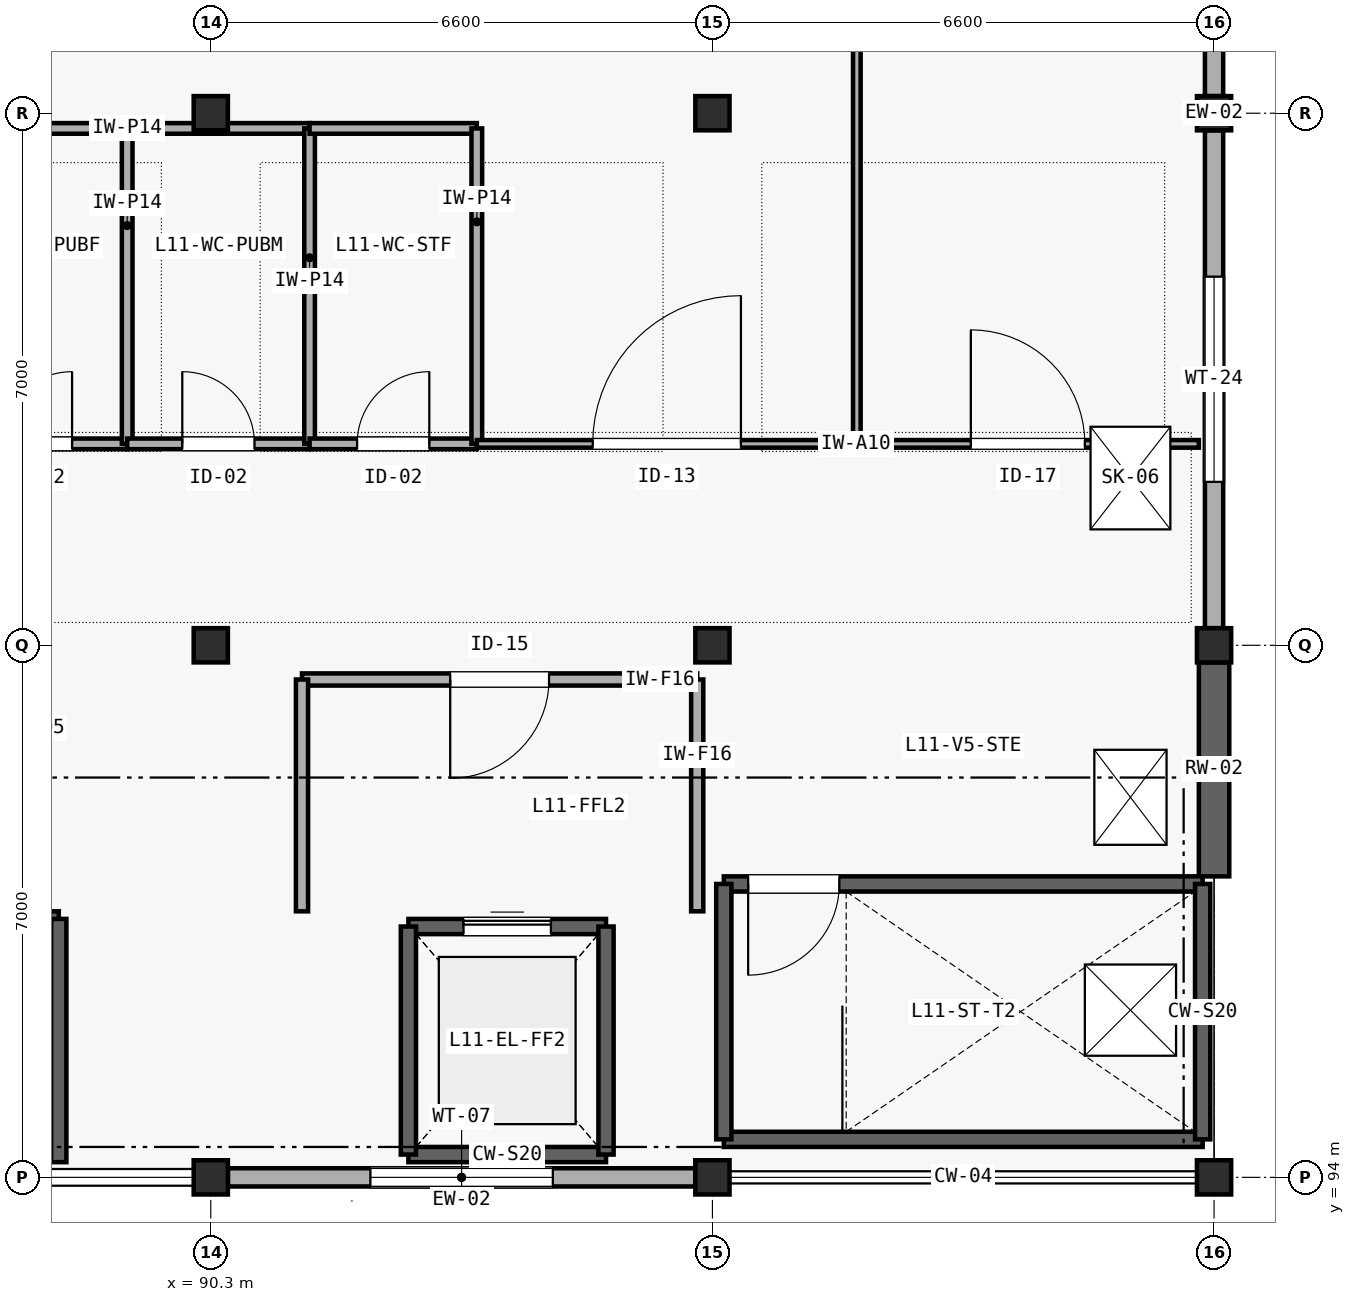
"""IFC4 building model, lengths in metres.
Left out: names, types, materials, properties, quantities, classifications, styles, units other than length and angle.
Written with IfcOpenShell. Run it as: python <this file> out.ifc"""

import sys

from ifc_helpers import new_model, si_unit, direction, frame, frame_2d, origin, origin_2d, place, context, subcontext, project, spatial, rectangle, extrude, element, fill, save


model = new_model("IFC4")
c1 = context("Model", 3, precision=1e-05, world=origin(), true_north=direction((0.0, 1.0)))
c2 = subcontext(c1, "Body", "Model", "MODEL_VIEW")
j1 = project(units=[si_unit("LENGTHUNIT", "METRE"), si_unit("PLANEANGLEUNIT", "RADIAN")], contexts=[c1])
p1 = place(None, origin())
s1 = spatial("IfcSite", under=j1, at=p1, CompositionType="ELEMENT")
p2 = place(p1, origin())
s2 = spatial("IfcBuilding", under=s1, at=p2, CompositionType="ELEMENT")
p3 = place(p2, frame((0.0, 0.0, 46.2)))
s3 = spatial("IfcBuildingStorey", under=s2, at=p3, CompositionType="ELEMENT", Elevation=46.2)
for number, where, z_axis, x_axis in (
    (1, (90.3, 94.0, 0.0), (0.0, 0.0, 1.0), (1.0, 0.0, 0.0)),
    (2, (90.3, 101.0, 0.0), (0.0, 0.0, 1.0), (1.0, 0.0, 0.0)),
    (3, (90.3, 108.0, 0.0), (0.0, 0.0, 1.0), (1.0, 0.0, 0.0)),
    (4, (96.9, 94.0, 0.0), (0.0, 0.0, 1.0), (1.0, 0.0, 0.0)),
    (5, (96.9, 101.0, 0.0), (0.0, 0.0, 1.0), (1.0, 0.0, 0.0)),
    (6, (96.9, 108.0, 0.0), (0.0, 0.0, 1.0), (1.0, 0.0, 0.0)),
    (7, (103.5, 94.0, 0.0), (0.0, 0.0, 1.0), (1.0, 0.0, 0.0)),
    (8, (103.5, 101.0, 0.0), (0.0, 0.0, 1.0), (1.0, 0.0, 0.0)),
    (9, (103.5, 108.0, 0.0), (0.0, 0.0, 1.0), (1.0, 0.0, 0.0)),
):
    element("IfcColumn", number, at=place(p3, frame(where, z_axis=z_axis, x_axis=x_axis)), inside=s3, PredefinedType="COLUMN", context=c2, shape_type="SweptSolid", body=[
        extrude(rectangle(XDim=0.45, YDim=0.45, at=origin_2d()), origin(), (0.0, 0.0, 1.0), 4.2),
    ])
p4 = place(p3, frame((90.525, 94.0, 0.0), z_axis=(0.0, 0.0, 1.0), x_axis=(1.0, 0.0, 0.0)))
e10 = element("IfcWall", 10, at=p4, inside=s3, PredefinedType="SOLIDWALL", context=c2, shape_type="SweptSolid", body=[
    extrude(rectangle(XDim=6.15, YDim=0.24, at=frame_2d((3.075, 0.0))), origin(), (0.0, 0.0, 1.0), 3.135),
])
p5 = place(p4, frame((1.875, 0.0, 0.85)))
e11 = element("IfcOpeningElement", 11, at=p5, cuts=e10, PredefinedType="OPENING", context=c2, shape_type="SweptSolid", body=[
    extrude(rectangle(XDim=2.4, YDim=1.35, at=frame_2d((1.2, 0.675))), frame((0.0, 0.13, 0.0), z_axis=(0.0, -1.0, 0.0), x_axis=(1.0, 0.0, 0.0)), (0.0, 0.0, 1.0), 0.26),
])
p6 = place(p3, frame((103.5, 97.96, 0.0), z_axis=(0.0, 0.0, 1.0), x_axis=(0.0, 1.0, 0.0)))
e12 = element("IfcWall", 12, at=p6, inside=s3, PredefinedType="SHEAR", context=c2, shape_type="SweptSolid", body=[
    extrude(rectangle(XDim=2.815, YDim=0.4, at=frame_2d((1.407, 0.0))), origin(), (0.0, 0.0, 1.0), 3.85),
])
p7 = place(p3, frame((103.5, 101.225, 0.0), z_axis=(0.0, 0.0, 1.0), x_axis=(0.0, 1.0, 0.0)))
e13 = element("IfcWall", 13, at=p7, inside=s3, PredefinedType="SOLIDWALL", context=c2, shape_type="SweptSolid", body=[
    extrude(rectangle(XDim=6.55, YDim=0.24, at=frame_2d((3.275, 0.0))), origin(), (0.0, 0.0, 1.0), 3.247),
])
p8 = place(p7, frame((1.925, 0.0, 0.85)))
e14 = element("IfcOpeningElement", 14, at=p8, cuts=e13, PredefinedType="OPENING", context=c2, shape_type="SweptSolid", body=[
    extrude(rectangle(XDim=2.7, YDim=1.6, at=frame_2d((1.35, 0.8))), frame((0.0, 0.13, 0.0), z_axis=(0.0, -1.0, 0.0), x_axis=(1.0, 0.0, 0.0)), (0.0, 0.0, 1.0), 0.26),
])
p9 = place(p3, frame((103.5, 108.225, 0.0), z_axis=(0.0, 0.0, 1.0), x_axis=(0.0, 1.0, 0.0)))
e15 = element("IfcWall", 15, at=p9, inside=s3, PredefinedType="SOLIDWALL", context=c2, shape_type="SweptSolid", body=[
    extrude(rectangle(XDim=6.55, YDim=0.24, at=frame_2d((3.275, 0.0))), origin(), (0.0, 0.0, 1.0), 3.313),
])
p10 = place(p9, frame((1.625, 0.0, 0.85)))
e16 = element("IfcOpeningElement", 16, at=p10, cuts=e15, PredefinedType="OPENING", context=c2, shape_type="SweptSolid", body=[
    extrude(rectangle(XDim=3.3, YDim=1.6, at=frame_2d((1.65, 0.8))), frame((0.0, 0.13, 0.0), z_axis=(0.0, -1.0, 0.0), x_axis=(1.0, 0.0, 0.0)), (0.0, 0.0, 1.0), 0.26),
])
p11 = place(p3, frame((97.05, 94.5, 0.0), z_axis=(0.0, 0.0, 1.0), x_axis=(1.0, 0.0, 0.0)))
e17 = element("IfcWall", 17, at=p11, inside=s3, PredefinedType="SHEAR", context=c2, shape_type="SweptSolid", body=[
    extrude(rectangle(XDim=6.3, YDim=0.2, at=frame_2d((3.15, 0.0))), origin(), (0.0, 0.0, 1.0), 4.2),
])
p12 = place(p3, frame((97.05, 97.86, 0.0), z_axis=(0.0, 0.0, 1.0), x_axis=(1.0, 0.0, 0.0)))
e18 = element("IfcWall", 18, at=p12, inside=s3, PredefinedType="SHEAR", context=c2, shape_type="SweptSolid", body=[
    extrude(rectangle(XDim=6.3, YDim=0.2, at=frame_2d((3.15, 0.0))), origin(), (0.0, 0.0, 1.0), 4.2),
])
p13 = place(p12, frame((0.32, 0.0, 0.0)))
e19 = element("IfcOpeningElement", 19, at=p13, cuts=e18, PredefinedType="OPENING", context=c2, shape_type="SweptSolid", body=[
    extrude(rectangle(XDim=1.2, YDim=2.15, at=frame_2d((0.6, 1.075))), frame((0.0, 0.11, 0.0), z_axis=(0.0, -1.0, 0.0), x_axis=(1.0, 0.0, 0.0)), (0.0, 0.0, 1.0), 0.22),
])
for number, where, z_axis, x_axis in (
    (20, (97.05, 94.5, 0.0), (0.0, 0.0, 1.0), (0.0, 1.0, 0.0)),
    (21, (103.35, 94.5, 0.0), (0.0, 0.0, 1.0), (0.0, 1.0, 0.0)),
):
    element("IfcWall", number, at=place(p3, frame(where, z_axis=z_axis, x_axis=x_axis)), inside=s3, PredefinedType="SHEAR", context=c2, shape_type="SweptSolid", body=[
        extrude(rectangle(XDim=3.36, YDim=0.2, at=frame_2d((1.68, 0.0))), origin(), (0.0, 0.0, 1.0), 4.2),
    ])
p14 = place(p3, frame((92.9, 94.3, 0.0), z_axis=(0.0, 0.0, 1.0), x_axis=(1.0, 0.0, 0.0)))
e22 = element("IfcWall", 22, at=p14, inside=s3, PredefinedType="SHEAR", context=c2, shape_type="SweptSolid", body=[
    extrude(rectangle(XDim=2.6, YDim=0.2, at=frame_2d((1.3, 0.0))), origin(), (0.0, 0.0, 1.0), 4.2),
])
p15 = place(p3, frame((92.9, 97.3, 0.0), z_axis=(0.0, 0.0, 1.0), x_axis=(1.0, 0.0, 0.0)))
e23 = element("IfcWall", 23, at=p15, inside=s3, PredefinedType="SHEAR", context=c2, shape_type="SweptSolid", body=[
    extrude(rectangle(XDim=2.6, YDim=0.2, at=frame_2d((1.3, 0.0))), origin(), (0.0, 0.0, 1.0), 4.2),
])
p16 = place(p15, frame((0.725, 0.0, 0.0)))
e24 = element("IfcOpeningElement", 24, at=p16, cuts=e23, PredefinedType="OPENING", context=c2, shape_type="SweptSolid", body=[
    extrude(rectangle(XDim=1.15, YDim=2.2, at=frame_2d((0.575, 1.1))), frame((0.0, 0.11, 0.0), z_axis=(0.0, -1.0, 0.0), x_axis=(1.0, 0.0, 0.0)), (0.0, 0.0, 1.0), 0.22),
])
for number, where, z_axis, x_axis in (
    (25, (92.9, 94.3, 0.0), (0.0, 0.0, 1.0), (0.0, 1.0, 0.0)),
    (26, (95.5, 94.3, 0.0), (0.0, 0.0, 1.0), (0.0, 1.0, 0.0)),
):
    element("IfcWall", number, at=place(p3, frame(where, z_axis=z_axis, x_axis=x_axis)), inside=s3, PredefinedType="SHEAR", context=c2, shape_type="SweptSolid", body=[
        extrude(rectangle(XDim=3.0, YDim=0.2, at=frame_2d((1.5, 0.0))), origin(), (0.0, 0.0, 1.0), 4.2),
    ])
p17 = place(p3, frame((85.7, 97.4, 0.0), z_axis=(0.0, 0.0, 1.0), x_axis=(1.0, 0.0, 0.0)))
e27 = element("IfcWall", 27, at=p17, inside=s3, PredefinedType="SHEAR", context=c2, shape_type="SweptSolid", body=[
    extrude(rectangle(XDim=2.6, YDim=0.2, at=frame_2d((1.3, 0.0))), origin(), (0.0, 0.0, 1.0), 4.2),
])
p18 = place(p17, frame((0.7, 0.0, 0.0)))
e28 = element("IfcOpeningElement", 28, at=p18, cuts=e27, PredefinedType="OPENING", context=c2, shape_type="SweptSolid", body=[
    extrude(rectangle(XDim=1.2, YDim=2.2, at=frame_2d((0.6, 1.1))), frame((0.0, 0.11, 0.0), z_axis=(0.0, -1.0, 0.0), x_axis=(1.0, 0.0, 0.0)), (0.0, 0.0, 1.0), 0.22),
])
p19 = place(p3, frame((88.3, 94.2, 0.0), z_axis=(0.0, 0.0, 1.0), x_axis=(0.0, 1.0, 0.0)))
e29 = element("IfcWall", 29, at=p19, inside=s3, PredefinedType="SHEAR", context=c2, shape_type="SweptSolid", body=[
    extrude(rectangle(XDim=3.2, YDim=0.2, at=frame_2d((1.6, 0.0))), origin(), (0.0, 0.0, 1.0), 4.2),
])
p20 = place(p3, frame((91.5, 100.55, 0.0), z_axis=(0.0, 0.0, 1.0), x_axis=(1.0, 0.0, 0.0)))
e30 = element("IfcWall", 30, at=p20, inside=s3, PredefinedType="SOLIDWALL", context=c2, shape_type="SweptSolid", body=[
    extrude(rectangle(XDim=5.2, YDim=0.16, at=frame_2d((2.6, 0.0))), origin(), (0.0, 0.0, 1.0), 3.9),
])
p21 = place(p20, frame((1.95, 0.0, 0.0)))
e31 = element("IfcOpeningElement", 31, at=p21, cuts=e30, PredefinedType="OPENING", context=c2, shape_type="SweptSolid", body=[
    extrude(rectangle(XDim=1.3, YDim=2.15, at=frame_2d((0.65, 1.075))), frame((0.0, 0.09, 0.0), z_axis=(0.0, -1.0, 0.0), x_axis=(1.0, 0.0, 0.0)), (0.0, 0.0, 1.0), 0.18),
])
p22 = place(p3, frame((91.5, 97.5, 0.0), z_axis=(0.0, 0.0, 1.0), x_axis=(0.0, 1.0, 0.0)))
e32 = element("IfcWall", 32, at=p22, inside=s3, PredefinedType="SOLIDWALL", context=c2, shape_type="SweptSolid", body=[
    extrude(rectangle(XDim=3.05, YDim=0.16, at=frame_2d((1.525, 0.0))), origin(), (0.0, 0.0, 1.0), 3.9),
])
p23 = place(p3, frame((96.7, 97.5, 0.0), z_axis=(0.0, 0.0, 1.0), x_axis=(0.0, 1.0, 0.0)))
e33 = element("IfcWall", 33, at=p23, inside=s3, PredefinedType="SOLIDWALL", context=c2, shape_type="SweptSolid", body=[
    extrude(rectangle(XDim=3.05, YDim=0.16, at=frame_2d((1.525, 0.0))), origin(), (0.0, 0.0, 1.0), 3.405),
])
p24 = place(p3, frame((86.8, 103.65, 0.0), z_axis=(0.0, 0.0, 1.0), x_axis=(1.0, 0.0, 0.0)))
e34 = element("IfcWall", 34, at=p24, inside=s3, PredefinedType="PLUMBINGWALL", context=c2, shape_type="SweptSolid", body=[
    extrude(rectangle(XDim=2.4, YDim=0.14, at=frame_2d((1.2, 0.0))), origin(), (0.0, 0.0, 1.0), 3.9),
])
p25 = place(p24, frame((0.725, 0.0, 0.0)))
e35 = element("IfcOpeningElement", 35, at=p25, cuts=e34, PredefinedType="OPENING", context=c2, shape_type="SweptSolid", body=[
    extrude(rectangle(XDim=0.95, YDim=2.1, at=frame_2d((0.475, 1.05))), frame((0.0, 0.08, 0.0), z_axis=(0.0, -1.0, 0.0), x_axis=(1.0, 0.0, 0.0)), (0.0, 0.0, 1.0), 0.16),
])
p26 = place(p3, frame((86.8, 107.8, 0.0), z_axis=(0.0, 0.0, 1.0), x_axis=(1.0, 0.0, 0.0)))
e36 = element("IfcWall", 36, at=p26, inside=s3, PredefinedType="PLUMBINGWALL", context=c2, shape_type="SweptSolid", body=[
    extrude(rectangle(XDim=2.4, YDim=0.14, at=frame_2d((1.2, 0.0))), origin(), (0.0, 0.0, 1.0), 3.135),
])
p27 = place(p3, frame((89.2, 103.65, 0.0), z_axis=(0.0, 0.0, 1.0), x_axis=(0.0, 1.0, 0.0)))
e37 = element("IfcWall", 37, at=p27, inside=s3, PredefinedType="PLUMBINGWALL", context=c2, shape_type="SweptSolid", body=[
    extrude(rectangle(XDim=4.15, YDim=0.14, at=frame_2d((2.075, 0.0))), origin(), (0.0, 0.0, 1.0), 3.9),
])
p28 = place(p3, frame((89.2, 103.65, 0.0), z_axis=(0.0, 0.0, 1.0), x_axis=(1.0, 0.0, 0.0)))
e38 = element("IfcWall", 38, at=p28, inside=s3, PredefinedType="PLUMBINGWALL", context=c2, shape_type="SweptSolid", body=[
    extrude(rectangle(XDim=2.4, YDim=0.14, at=frame_2d((1.2, 0.0))), origin(), (0.0, 0.0, 1.0), 3.9),
])
p29 = place(p28, frame((0.725, 0.0, 0.0)))
e39 = element("IfcOpeningElement", 39, at=p29, cuts=e38, PredefinedType="OPENING", context=c2, shape_type="SweptSolid", body=[
    extrude(rectangle(XDim=0.95, YDim=2.1, at=frame_2d((0.475, 1.05))), frame((0.0, 0.08, 0.0), z_axis=(0.0, -1.0, 0.0), x_axis=(1.0, 0.0, 0.0)), (0.0, 0.0, 1.0), 0.16),
])
p30 = place(p3, frame((89.2, 107.8, 0.0), z_axis=(0.0, 0.0, 1.0), x_axis=(1.0, 0.0, 0.0)))
e40 = element("IfcWall", 40, at=p30, inside=s3, PredefinedType="PLUMBINGWALL", context=c2, shape_type="SweptSolid", body=[
    extrude(rectangle(XDim=2.4, YDim=0.14, at=frame_2d((1.2, 0.0))), origin(), (0.0, 0.0, 1.0), 3.135),
])
p31 = place(p3, frame((91.6, 103.65, 0.0), z_axis=(0.0, 0.0, 1.0), x_axis=(0.0, 1.0, 0.0)))
e41 = element("IfcWall", 41, at=p31, inside=s3, PredefinedType="PLUMBINGWALL", context=c2, shape_type="SweptSolid", body=[
    extrude(rectangle(XDim=4.15, YDim=0.14, at=frame_2d((2.075, 0.0))), origin(), (0.0, 0.0, 1.0), 3.9),
])
p32 = place(p3, frame((91.6, 103.65, 0.0), z_axis=(0.0, 0.0, 1.0), x_axis=(1.0, 0.0, 0.0)))
e42 = element("IfcWall", 42, at=p32, inside=s3, PredefinedType="PLUMBINGWALL", context=c2, shape_type="SweptSolid", body=[
    extrude(rectangle(XDim=2.2, YDim=0.14, at=frame_2d((1.1, 0.0))), origin(), (0.0, 0.0, 1.0), 3.9),
])
p33 = place(p32, frame((0.625, 0.0, 0.0)))
e43 = element("IfcOpeningElement", 43, at=p33, cuts=e42, PredefinedType="OPENING", context=c2, shape_type="SweptSolid", body=[
    extrude(rectangle(XDim=0.95, YDim=2.1, at=frame_2d((0.475, 1.05))), frame((0.0, 0.08, 0.0), z_axis=(0.0, -1.0, 0.0), x_axis=(1.0, 0.0, 0.0)), (0.0, 0.0, 1.0), 0.16),
])
p34 = place(p3, frame((91.6, 107.8, 0.0), z_axis=(0.0, 0.0, 1.0), x_axis=(1.0, 0.0, 0.0)))
e44 = element("IfcWall", 44, at=p34, inside=s3, PredefinedType="PLUMBINGWALL", context=c2, shape_type="SweptSolid", body=[
    extrude(rectangle(XDim=2.2, YDim=0.14, at=frame_2d((1.1, 0.0))), origin(), (0.0, 0.0, 1.0), 3.135),
])
p35 = place(p3, frame((93.8, 103.65, 0.0), z_axis=(0.0, 0.0, 1.0), x_axis=(0.0, 1.0, 0.0)))
e45 = element("IfcWall", 45, at=p35, inside=s3, PredefinedType="PLUMBINGWALL", context=c2, shape_type="SweptSolid", body=[
    extrude(rectangle(XDim=4.15, YDim=0.14, at=frame_2d((2.075, 0.0))), origin(), (0.0, 0.0, 1.0), 3.9),
])
p36 = place(p3, frame((93.8, 103.65, 0.0), z_axis=(0.0, 0.0, 1.0), x_axis=(1.0, 0.0, 0.0)))
e46 = element("IfcWall", 46, at=p36, inside=s3, PredefinedType="PARTITIONING", context=c2, shape_type="SweptSolid", body=[
    extrude(rectangle(XDim=5.0, YDim=0.1, at=frame_2d((2.5, 0.0))), origin(), (0.0, 0.0, 1.0), 3.9),
])
p37 = place(p36, frame((1.525, 0.0, 0.0)))
e47 = element("IfcOpeningElement", 47, at=p37, cuts=e46, PredefinedType="OPENING", context=c2, shape_type="SweptSolid", body=[
    extrude(rectangle(XDim=1.95, YDim=2.3, at=frame_2d((0.975, 1.15))), frame((0.0, 0.06, 0.0), z_axis=(0.0, -1.0, 0.0), x_axis=(1.0, 0.0, 0.0)), (0.0, 0.0, 1.0), 0.12),
])
p38 = place(p3, frame((98.8, 103.65, 0.0), z_axis=(0.0, 0.0, 1.0), x_axis=(0.0, 1.0, 0.0)))
e48 = element("IfcWall", 48, at=p38, inside=s3, PredefinedType="PARTITIONING", context=c2, shape_type="SweptSolid", body=[
    extrude(rectangle(XDim=11.15, YDim=0.1, at=frame_2d((5.575, 0.0))), origin(), (0.0, 0.0, 1.0), 3.9),
])
p39 = place(p3, frame((98.8, 103.65, 0.0), z_axis=(0.0, 0.0, 1.0), x_axis=(1.0, 0.0, 0.0)))
e49 = element("IfcWall", 49, at=p39, inside=s3, PredefinedType="PARTITIONING", context=c2, shape_type="SweptSolid", body=[
    extrude(rectangle(XDim=4.5, YDim=0.1, at=frame_2d((2.25, 0.0))), origin(), (0.0, 0.0, 1.0), 3.9),
])
p40 = place(p39, frame((1.5, 0.0, 0.0)))
e50 = element("IfcOpeningElement", 50, at=p40, cuts=e49, PredefinedType="OPENING", context=c2, shape_type="SweptSolid", body=[
    extrude(rectangle(XDim=1.5, YDim=2.15, at=frame_2d((0.75, 1.075))), frame((0.0, 0.06, 0.0), z_axis=(0.0, -1.0, 0.0), x_axis=(1.0, 0.0, 0.0)), (0.0, 0.0, 1.0), 0.12),
])
p41 = place(p5, origin())
e51 = element("IfcWindow", 51, at=p41, inside=s3, PartitioningType="SINGLE_PANEL", PredefinedType="WINDOW", context=c2, shape_type="SweptSolid", body=[
    extrude(rectangle(XDim=2.4, YDim=1.35, at=frame_2d((1.2, 0.675))), frame((0.0, 0.03, 0.0), z_axis=(0.0, -1.0, 0.0), x_axis=(1.0, 0.0, 0.0)), (0.0, 0.0, 1.0), 0.06),
])
fill(e11, e51)
p42 = place(p8, origin())
e52 = element("IfcWindow", 52, at=p42, inside=s3, PartitioningType="SINGLE_PANEL", PredefinedType="WINDOW", context=c2, shape_type="SweptSolid", body=[
    extrude(rectangle(XDim=2.7, YDim=1.6, at=frame_2d((1.35, 0.8))), frame((0.0, 0.03, 0.0), z_axis=(0.0, -1.0, 0.0), x_axis=(1.0, 0.0, 0.0)), (0.0, 0.0, 1.0), 0.06),
])
fill(e14, e52)
p43 = place(p2, frame((0.0, 0.0, 50.4)))
p44 = place(p43, frame((0.0, 0.0, -0.26)))
p45 = place(p44, frame((102.4, 96.2, 0.21)))
e53 = element("IfcWindow", 53, at=p45, inside=s3, PartitioningType="SINGLE_PANEL", PredefinedType="SKYLIGHT", context=c2, shape_type="SweptSolid", body=[
    extrude(rectangle(XDim=1.2, YDim=1.2, at=origin_2d()), origin(), (0.0, 0.0, 1.0), 0.05),
])
p46 = place(p44, frame((102.4, 99.0, 0.21)))
e54 = element("IfcWindow", 54, at=p46, inside=s3, PartitioningType="SINGLE_PANEL", PredefinedType="SKYLIGHT", context=c2, shape_type="SweptSolid", body=[
    extrude(rectangle(XDim=0.95, YDim=1.25, at=origin_2d()), origin(), (0.0, 0.0, 1.0), 0.05),
])
p47 = place(p44, frame((102.4, 103.2, 0.21)))
e55 = element("IfcWindow", 55, at=p47, inside=s3, PartitioningType="SINGLE_PANEL", PredefinedType="SKYLIGHT", context=c2, shape_type="SweptSolid", body=[
    extrude(rectangle(XDim=1.05, YDim=1.35, at=origin_2d()), origin(), (0.0, 0.0, 1.0), 0.05),
])
p48 = place(p13, frame((1.2, 0.0, 0.0), z_axis=(0.0, 0.0, 1.0), x_axis=(-1.0, 0.0, 0.0)))
e56 = element("IfcDoor", 56, at=p48, inside=s3, OperationType="SINGLE_SWING_RIGHT", PredefinedType="DOOR", context=c2, shape_type="SweptSolid", body=[
    extrude(rectangle(XDim=1.2, YDim=2.15, at=frame_2d((0.6, 1.075))), frame((0.0, 0.025, 0.0), z_axis=(0.0, -1.0, 0.0), x_axis=(1.0, 0.0, 0.0)), (0.0, 0.0, 1.0), 0.05),
])
fill(e19, e56)
p49 = place(p16, origin())
e57 = element("IfcDoor", 57, at=p49, inside=s3, OperationType="SLIDING_TO_LEFT", PredefinedType="DOOR", context=c2, shape_type="SweptSolid", body=[
    extrude(rectangle(XDim=1.15, YDim=2.2, at=frame_2d((0.575, 1.1))), frame((0.0, 0.025, 0.0), z_axis=(0.0, -1.0, 0.0), x_axis=(1.0, 0.0, 0.0)), (0.0, 0.0, 1.0), 0.05),
])
fill(e24, e57)
p50 = place(p21, frame((1.3, 0.0, 0.0), z_axis=(0.0, 0.0, 1.0), x_axis=(-1.0, 0.0, 0.0)))
e58 = element("IfcDoor", 58, at=p50, inside=s3, OperationType="SINGLE_SWING_RIGHT", PredefinedType="DOOR", context=c2, shape_type="SweptSolid", body=[
    extrude(rectangle(XDim=1.3, YDim=2.15, at=frame_2d((0.65, 1.075))), frame((0.0, 0.025, 0.0), z_axis=(0.0, -1.0, 0.0), x_axis=(1.0, 0.0, 0.0)), (0.0, 0.0, 1.0), 0.05),
])
fill(e31, e58)
p51 = place(p25, origin())
e59 = element("IfcDoor", 59, at=p51, inside=s3, OperationType="SINGLE_SWING_RIGHT", PredefinedType="DOOR", context=c2, shape_type="SweptSolid", body=[
    extrude(rectangle(XDim=0.95, YDim=2.1, at=frame_2d((0.475, 1.05))), frame((0.0, 0.025, 0.0), z_axis=(0.0, -1.0, 0.0), x_axis=(1.0, 0.0, 0.0)), (0.0, 0.0, 1.0), 0.05),
])
fill(e35, e59)
p52 = place(p29, origin())
e60 = element("IfcDoor", 60, at=p52, inside=s3, OperationType="SINGLE_SWING_LEFT", PredefinedType="DOOR", context=c2, shape_type="SweptSolid", body=[
    extrude(rectangle(XDim=0.95, YDim=2.1, at=frame_2d((0.475, 1.05))), frame((0.0, 0.025, 0.0), z_axis=(0.0, -1.0, 0.0), x_axis=(1.0, 0.0, 0.0)), (0.0, 0.0, 1.0), 0.05),
])
fill(e39, e60)
p53 = place(p33, origin())
e61 = element("IfcDoor", 61, at=p53, inside=s3, OperationType="SINGLE_SWING_RIGHT", PredefinedType="DOOR", context=c2, shape_type="SweptSolid", body=[
    extrude(rectangle(XDim=0.95, YDim=2.1, at=frame_2d((0.475, 1.05))), frame((0.0, 0.025, 0.0), z_axis=(0.0, -1.0, 0.0), x_axis=(1.0, 0.0, 0.0)), (0.0, 0.0, 1.0), 0.05),
])
fill(e43, e61)
p54 = place(p37, origin())
e62 = element("IfcDoor", 62, at=p54, inside=s3, OperationType="SINGLE_SWING_RIGHT", PredefinedType="DOOR", context=c2, shape_type="SweptSolid", body=[
    extrude(rectangle(XDim=1.95, YDim=2.3, at=frame_2d((0.975, 1.15))), frame((0.0, 0.025, 0.0), z_axis=(0.0, -1.0, 0.0), x_axis=(1.0, 0.0, 0.0)), (0.0, 0.0, 1.0), 0.05),
])
fill(e47, e62)
p55 = place(p40, origin())
e63 = element("IfcDoor", 63, at=p55, inside=s3, OperationType="SINGLE_SWING_LEFT", PredefinedType="DOOR", context=c2, shape_type="SweptSolid", body=[
    extrude(rectangle(XDim=1.5, YDim=2.15, at=frame_2d((0.75, 1.075))), frame((0.0, 0.025, 0.0), z_axis=(0.0, -1.0, 0.0), x_axis=(1.0, 0.0, 0.0)), (0.0, 0.0, 1.0), 0.05),
])
fill(e50, e63)
save(model, sys.argv[1])
